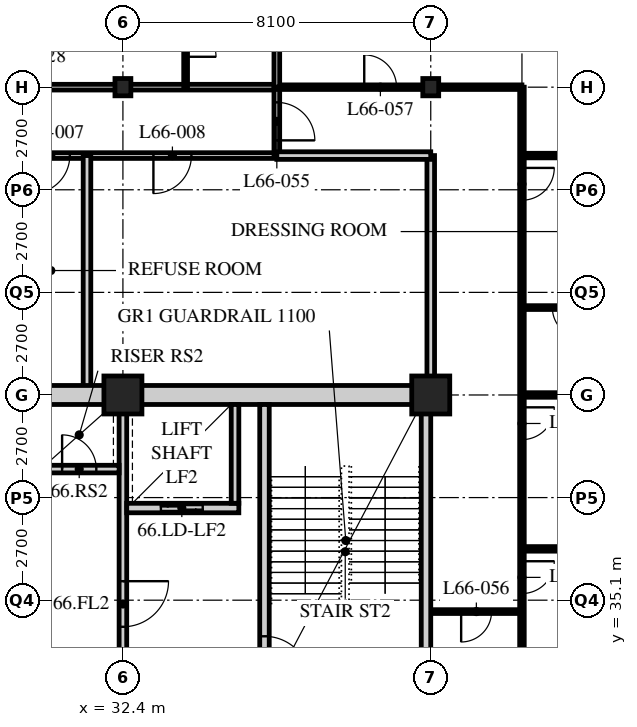
"""IFC4 building model, lengths in metres.
Left out: names, types, materials, properties, quantities, classifications, styles, units other than length and angle.
Written with IfcOpenShell. Run it as: python <this file> out.ifc"""

import sys

from ifc_helpers import new_model, si_unit, direction, frame, frame_2d, origin, origin_2d, place, context, subcontext, project, spatial, rectangle, hollow_rectangle, i_section, extrude, element, fill, save


model = new_model("IFC4")
c1 = context("Model", 3, precision=1e-05, world=origin(), true_north=direction((0.0, 1.0)))
c2 = subcontext(c1, "Body", "Model", "MODEL_VIEW")
j1 = project(units=[si_unit("LENGTHUNIT", "METRE"), si_unit("PLANEANGLEUNIT", "RADIAN")], contexts=[c1])
p1 = place(None, origin())
s1 = spatial("IfcSite", under=j1, at=p1, CompositionType="ELEMENT")
p2 = place(p1, origin())
s2 = spatial("IfcBuilding", under=s1, at=p2, CompositionType="ELEMENT")
p3 = place(p2, frame((0.0, 0.0, 258.0)))
s3 = spatial("IfcBuildingStorey", under=s2, at=p3, CompositionType="ELEMENT", Elevation=258.0)
p4 = place(p3, frame((32.4, 40.5, 0.0), z_axis=(0.0, 0.0, 1.0), x_axis=(1.0, 0.0, 0.0)))
e1 = element("IfcColumn", 1, at=p4, inside=s3, PredefinedType="COLUMN", context=c2, shape_type="SweptSolid", body=[
    extrude(hollow_rectangle(XDim=1.0, YDim=1.0, WallThickness=0.1, at=origin_2d()), origin(), (0.0, 0.0, 1.0), 3.9),
])
p5 = place(p3, frame((32.4, 48.6, 0.0), z_axis=(0.0, 0.0, 1.0), x_axis=(1.0, 0.0, 0.0)))
e2 = element("IfcColumn", 2, at=p5, inside=s3, PredefinedType="COLUMN", context=c2, shape_type="SweptSolid", body=[
    extrude(i_section(OverallWidth=0.418, OverallDepth=0.456, WebThickness=0.042, FlangeThickness=0.067, FilletRadius=0.015, at=origin_2d()), origin(), (0.0, 0.0, 1.0), 3.9),
])
p6 = place(p3, frame((40.5, 40.5, 0.0), z_axis=(0.0, 0.0, 1.0), x_axis=(1.0, 0.0, 0.0)))
e3 = element("IfcColumn", 3, at=p6, inside=s3, PredefinedType="COLUMN", context=c2, shape_type="SweptSolid", body=[
    extrude(hollow_rectangle(XDim=1.0, YDim=1.0, WallThickness=0.1, at=origin_2d()), origin(), (0.0, 0.0, 1.0), 3.9),
])
p7 = place(p3, frame((40.5, 48.6, 0.0), z_axis=(0.0, 0.0, 1.0), x_axis=(1.0, 0.0, 0.0)))
e4 = element("IfcColumn", 4, at=p7, inside=s3, PredefinedType="COLUMN", context=c2, shape_type="SweptSolid", body=[
    extrude(i_section(OverallWidth=0.418, OverallDepth=0.456, WebThickness=0.042, FlangeThickness=0.067, FilletRadius=0.015, at=origin_2d()), origin(), (0.0, 0.0, 1.0), 3.9),
])
p8 = place(p3, frame((8.1, 48.6, 0.0), z_axis=(0.0, 0.0, 1.0), x_axis=(1.0, 0.0, 0.0)))
e5 = element("IfcWall", 5, at=p8, inside=s3, PredefinedType="PARTITIONING", context=c2, shape_type="SweptSolid", body=[
    extrude(rectangle(XDim=28.35, YDim=0.15, at=frame_2d((14.175, 0.0))), origin(), (0.0, 0.0, 1.0), 3.078),
])
p9 = place(p8, frame((4.45, 0.0, 0.0)))
e6 = element("IfcOpeningElement", 6, at=p9, cuts=e5, PredefinedType="OPENING", context=c2, shape_type="SweptSolid", body=[
    extrude(rectangle(XDim=1.0, YDim=2.1, at=frame_2d((0.5, 1.05))), frame((0.0, 0.085, 0.0), z_axis=(0.0, -1.0, 0.0), x_axis=(1.0, 0.0, 0.0)), (0.0, 0.0, 1.0), 0.17),
])
p10 = place(p8, frame((20.65, 0.0, 0.0)))
e7 = element("IfcOpeningElement", 7, at=p10, cuts=e5, PredefinedType="OPENING", context=c2, shape_type="SweptSolid", body=[
    extrude(rectangle(XDim=1.0, YDim=2.1, at=frame_2d((0.5, 1.05))), frame((0.0, 0.085, 0.0), z_axis=(0.0, -1.0, 0.0), x_axis=(1.0, 0.0, 0.0)), (0.0, 0.0, 1.0), 0.17),
])
p11 = place(p8, frame((1.525, 0.0, 0.0)))
e8 = element("IfcOpeningElement", 8, at=p11, cuts=e5, PredefinedType="OPENING", context=c2, shape_type="SweptSolid", body=[
    extrude(rectangle(XDim=1.0, YDim=2.1, at=frame_2d((0.5, 1.05))), frame((0.0, 0.085, 0.0), z_axis=(0.0, -1.0, 0.0), x_axis=(1.0, 0.0, 0.0)), (0.0, 0.0, 1.0), 0.17),
])
p12 = place(p3, frame((29.56, 46.8, 0.0), z_axis=(0.0, 0.0, 1.0), x_axis=(1.0, 0.0, 0.0)))
e9 = element("IfcWall", 9, at=p12, inside=s3, PredefinedType="PARTITIONING", context=c2, shape_type="SweptSolid", body=[
    extrude(rectangle(XDim=6.89, YDim=0.15, at=frame_2d((3.445, 0.0))), origin(), (0.0, 0.0, 1.0), 3.69),
])
p13 = place(p12, frame((0.442, 0.0, 0.0)))
e10 = element("IfcOpeningElement", 10, at=p13, cuts=e9, PredefinedType="OPENING", context=c2, shape_type="SweptSolid", body=[
    extrude(rectangle(XDim=1.0, YDim=2.1, at=frame_2d((0.5, 1.05))), frame((0.0, 0.085, 0.0), z_axis=(0.0, -1.0, 0.0), x_axis=(1.0, 0.0, 0.0)), (0.0, 0.0, 1.0), 0.17),
])
p14 = place(p12, frame((3.642, 0.0, 0.0)))
e11 = element("IfcOpeningElement", 11, at=p14, cuts=e9, PredefinedType="OPENING", context=c2, shape_type="SweptSolid", body=[
    extrude(rectangle(XDim=1.0, YDim=2.1, at=frame_2d((0.5, 1.05))), frame((0.0, 0.085, 0.0), z_axis=(0.0, -1.0, 0.0), x_axis=(1.0, 0.0, 0.0)), (0.0, 0.0, 1.0), 0.17),
])
p15 = place(p3, frame((31.455, 46.8, 0.0), z_axis=(0.0, 0.0, 1.0), x_axis=(0.0, -1.0, 0.0)))
e12 = element("IfcWall", 12, at=p15, inside=s3, PredefinedType="SOLIDWALL", context=c2, shape_type="SweptSolid", body=[
    extrude(rectangle(XDim=6.3, YDim=0.2, at=frame_2d((3.15, 0.0))), origin(), (0.0, 0.0, 1.0), 3.69),
])
p16 = place(p3, frame((36.45, 46.8, 0.0), z_axis=(0.0, 0.0, 1.0), x_axis=(0.0, 1.0, 0.0)))
e13 = element("IfcWall", 13, at=p16, inside=s3, PredefinedType="PARTITIONING", context=c2, shape_type="SweptSolid", body=[
    extrude(rectangle(XDim=1.8, YDim=0.15, at=frame_2d((0.9, 0.0))), origin(), (0.0, 0.0, 1.0), 3.69),
])
p17 = place(p16, frame((0.4, 0.0, 0.0)))
e14 = element("IfcOpeningElement", 14, at=p17, cuts=e13, PredefinedType="OPENING", context=c2, shape_type="SweptSolid", body=[
    extrude(rectangle(XDim=1.0, YDim=2.1, at=frame_2d((0.5, 1.05))), frame((0.0, 0.085, 0.0), z_axis=(0.0, -1.0, 0.0), x_axis=(1.0, 0.0, 0.0)), (0.0, 0.0, 1.0), 0.17),
])
p18 = place(p3, frame((40.5, 40.5, 0.0), z_axis=(0.0, 0.0, 1.0), x_axis=(0.0, 1.0, 0.0)))
e15 = element("IfcWall", 15, at=p18, inside=s3, PredefinedType="SOLIDWALL", context=c2, shape_type="SweptSolid", body=[
    extrude(rectangle(XDim=6.3, YDim=0.2, at=frame_2d((3.15, 0.0))), origin(), (0.0, 0.0, 1.0), 3.078),
])
p19 = place(p3, frame((34.05, 48.6, 0.0), z_axis=(0.0, 0.0, 1.0), x_axis=(0.0, 1.0, 0.0)))
e16 = element("IfcWall", 16, at=p19, inside=s3, PredefinedType="PARTITIONING", context=c2, shape_type="SweptSolid", body=[
    extrude(rectangle(XDim=2.4, YDim=0.1, at=frame_2d((1.2, 0.0))), origin(), (0.0, 0.0, 1.0), 3.69),
])
p20 = place(p19, frame((0.8, 0.0, 0.0)))
e17 = element("IfcOpeningElement", 17, at=p20, cuts=e16, PredefinedType="OPENING", context=c2, shape_type="SweptSolid", body=[
    extrude(rectangle(XDim=0.8, YDim=2.1, at=frame_2d((0.4, 1.05))), frame((0.0, 0.06, 0.0), z_axis=(0.0, -1.0, 0.0), x_axis=(1.0, 0.0, 0.0)), (0.0, 0.0, 1.0), 0.12),
])
p21 = place(p3, frame((40.5, 34.8, 0.0), z_axis=(0.0, 0.0, 1.0), x_axis=(1.0, 0.0, 0.0)))
e18 = element("IfcWall", 18, at=p21, inside=s3, PredefinedType="PARTITIONING", context=c2, shape_type="SweptSolid", body=[
    extrude(rectangle(XDim=2.4, YDim=0.1, at=frame_2d((1.2, 0.0))), origin(), (0.0, 0.0, 1.0), 3.69),
])
p22 = place(p21, frame((0.8, 0.0, 0.0)))
e19 = element("IfcOpeningElement", 19, at=p22, cuts=e18, PredefinedType="OPENING", context=c2, shape_type="SweptSolid", body=[
    extrude(rectangle(XDim=0.8, YDim=2.1, at=frame_2d((0.4, 1.05))), frame((0.0, 0.06, 0.0), z_axis=(0.0, -1.0, 0.0), x_axis=(1.0, 0.0, 0.0)), (0.0, 0.0, 1.0), 0.12),
])
p23 = place(p3, frame((42.9, 48.6, 0.0), z_axis=(0.0, 0.0, 1.0), x_axis=(0.0, -1.0, 0.0)))
e20 = element("IfcWall", 20, at=p23, inside=s3, PredefinedType="PARTITIONING", context=c2, shape_type="SweptSolid", body=[
    extrude(rectangle(XDim=16.2, YDim=0.12, at=frame_2d((8.1, 0.0))), origin(), (0.0, 0.0, 1.0), 3.69),
])
p24 = place(p23, frame((2.125, 0.0, 0.0)))
e21 = element("IfcOpeningElement", 21, at=p24, cuts=e20, PredefinedType="OPENING", context=c2, shape_type="SweptSolid", body=[
    extrude(rectangle(XDim=0.85, YDim=2.1, at=frame_2d((0.425, 1.05))), frame((0.0, 0.07, 0.0), z_axis=(0.0, -1.0, 0.0), x_axis=(1.0, 0.0, 0.0)), (0.0, 0.0, 1.0), 0.14),
])
p25 = place(p23, frame((8.425, 0.0, 0.0)))
e22 = element("IfcOpeningElement", 22, at=p25, cuts=e20, PredefinedType="OPENING", context=c2, shape_type="SweptSolid", body=[
    extrude(rectangle(XDim=0.85, YDim=2.1, at=frame_2d((0.425, 1.05))), frame((0.0, 0.07, 0.0), z_axis=(0.0, -1.0, 0.0), x_axis=(1.0, 0.0, 0.0)), (0.0, 0.0, 1.0), 0.14),
])
p26 = place(p23, frame((12.475, 0.0, 0.0)))
e23 = element("IfcOpeningElement", 23, at=p26, cuts=e20, PredefinedType="OPENING", context=c2, shape_type="SweptSolid", body=[
    extrude(rectangle(XDim=0.85, YDim=2.1, at=frame_2d((0.425, 1.05))), frame((0.0, 0.07, 0.0), z_axis=(0.0, -1.0, 0.0), x_axis=(1.0, 0.0, 0.0)), (0.0, 0.0, 1.0), 0.14),
])
p27 = place(p3, frame((36.45, 48.6, 0.0), z_axis=(0.0, 0.0, 1.0), x_axis=(1.0, 0.0, 0.0)))
e24 = element("IfcWall", 24, at=p27, inside=s3, PredefinedType="PARTITIONING", context=c2, shape_type="SweptSolid", body=[
    extrude(rectangle(XDim=6.45, YDim=0.12, at=frame_2d((3.225, 0.0))), origin(), (0.0, 0.0, 1.0), 3.078),
])
p28 = place(p27, frame((2.3, 0.0, 0.0)))
e25 = element("IfcOpeningElement", 25, at=p28, cuts=e24, PredefinedType="OPENING", context=c2, shape_type="SweptSolid", body=[
    extrude(rectangle(XDim=0.85, YDim=2.1, at=frame_2d((0.425, 1.05))), frame((0.0, 0.07, 0.0), z_axis=(0.0, -1.0, 0.0), x_axis=(1.0, 0.0, 0.0)), (0.0, 0.0, 1.0), 0.14),
])
p29 = place(p3, frame((36.45, 46.8, 0.0), z_axis=(0.0, 0.0, 1.0), x_axis=(1.0, 0.0, 0.0)))
e26 = element("IfcWall", 26, at=p29, inside=s3, PredefinedType="SOLIDWALL", context=c2, shape_type="SweptSolid", body=[
    extrude(rectangle(XDim=4.05, YDim=0.2, at=frame_2d((2.025, 0.0))), origin(), (0.0, 0.0, 1.0), 3.69),
])
p30 = place(p3, frame((42.9, 46.8, 0.0), z_axis=(0.0, 0.0, 1.0), x_axis=(1.0, 0.0, 0.0)))
e27 = element("IfcWall", 27, at=p30, inside=s3, PredefinedType="PARTITIONING", context=c2, shape_type="SweptSolid", body=[
    extrude(rectangle(XDim=13.5, YDim=0.12, at=frame_2d((6.75, 0.0))), origin(), (0.0, 0.0, 1.0), 3.69),
])
p31 = place(p3, frame((36.45, 64.5, 0.0), z_axis=(0.0, 0.0, 1.0), x_axis=(0.0, -1.0, 0.0)))
e28 = element("IfcWall", 28, at=p31, inside=s3, PredefinedType="PARTITIONING", context=c2, shape_type="SweptSolid", body=[
    extrude(rectangle(XDim=15.9, YDim=0.15, at=frame_2d((7.95, 0.0))), origin(), (0.0, 0.0, 1.0), 3.69),
])
p32 = place(p3, frame((42.9, 42.8, 0.0), z_axis=(0.0, 0.0, 1.0), x_axis=(1.0, 0.0, 0.0)))
e29 = element("IfcWall", 29, at=p32, inside=s3, PredefinedType="PARTITIONING", context=c2, shape_type="SweptSolid", body=[
    extrude(rectangle(XDim=2.4, YDim=0.1, at=frame_2d((1.2, 0.0))), origin(), (0.0, 0.0, 1.0), 3.69),
])
p33 = place(p32, frame((0.8, 0.0, 0.0)))
e30 = element("IfcOpeningElement", 30, at=p33, cuts=e29, PredefinedType="OPENING", context=c2, shape_type="SweptSolid", body=[
    extrude(rectangle(XDim=0.8, YDim=2.1, at=frame_2d((0.4, 1.05))), frame((0.0, 0.06, 0.0), z_axis=(0.0, -1.0, 0.0), x_axis=(1.0, 0.0, 0.0)), (0.0, 0.0, 1.0), 0.12),
])
p34 = place(p3, frame((42.9, 40.5, 0.0), z_axis=(0.0, 0.0, 1.0), x_axis=(1.0, 0.0, 0.0)))
e31 = element("IfcWall", 31, at=p34, inside=s3, PredefinedType="PARTITIONING", context=c2, shape_type="SweptSolid", body=[
    extrude(rectangle(XDim=13.5, YDim=0.12, at=frame_2d((6.75, 0.0))), origin(), (0.0, 0.0, 1.0), 3.078),
])
p35 = place(p3, frame((42.9, 36.45, 0.0), z_axis=(0.0, 0.0, 1.0), x_axis=(1.0, 0.0, 0.0)))
e32 = element("IfcWall", 32, at=p35, inside=s3, PredefinedType="PARTITIONING", context=c2, shape_type="SweptSolid", body=[
    extrude(rectangle(XDim=13.5, YDim=0.12, at=frame_2d((6.75, 0.0))), origin(), (0.0, 0.0, 1.0), 3.69),
])
p36 = place(p3, frame((15.95, 40.5, 0.0), z_axis=(0.0, 0.0, 1.0), x_axis=(1.0, 0.0, 0.0)))
e33 = element("IfcWall", 33, at=p36, inside=s3, PredefinedType="SOLIDWALL", context=c2, shape_type="SweptSolid", body=[
    extrude(rectangle(XDim=24.55, YDim=0.5, at=frame_2d((12.275, 0.0))), origin(), (0.0, 0.0, 1.0), 3.04),
])
p37 = place(p36, frame((11.5, 0.0, 0.0)))
e34 = element("IfcOpeningElement", 34, at=p37, cuts=e33, PredefinedType="OPENING", context=c2, shape_type="SweptSolid", body=[
    extrude(rectangle(XDim=1.8, YDim=2.4, at=frame_2d((0.9, 1.2))), frame((0.0, 0.26, 0.0), z_axis=(0.0, -1.0, 0.0), x_axis=(1.0, 0.0, 0.0)), (0.0, 0.0, 1.0), 0.52),
])
p38 = place(p3, frame((40.375, 24.55, 0.0), z_axis=(0.0, 0.0, 1.0), x_axis=(0.0, 1.0, 0.0)))
e35 = element("IfcWall", 35, at=p38, inside=s3, PredefinedType="SOLIDWALL", context=c2, shape_type="SweptSolid", body=[
    extrude(rectangle(XDim=15.7, YDim=0.25, at=frame_2d((7.85, 0.0))), origin(), (0.0, 0.0, 1.0), 3.078),
])
p39 = place(p3, frame((32.4, 32.5, 0.0), z_axis=(0.0, 0.0, 1.0), x_axis=(0.0, 1.0, 0.0)))
e36 = element("IfcWall", 36, at=p39, inside=s3, PredefinedType="SOLIDWALL", context=c2, shape_type="SweptSolid", body=[
    extrude(rectangle(XDim=7.75, YDim=0.2, at=frame_2d((3.875, 0.0))), origin(), (0.0, 0.0, 1.0), 3.078),
])
p40 = place(p39, frame((1.9, 0.0, 0.0)))
e37 = element("IfcOpeningElement", 37, at=p40, cuts=e36, PredefinedType="OPENING", context=c2, shape_type="SweptSolid", body=[
    extrude(rectangle(XDim=1.2, YDim=2.1, at=frame_2d((0.6, 1.05))), frame((0.0, 0.11, 0.0), z_axis=(0.0, -1.0, 0.0), x_axis=(1.0, 0.0, 0.0)), (0.0, 0.0, 1.0), 0.22),
])
p41 = place(p3, frame((36.125, 32.5, 0.0), z_axis=(0.0, 0.0, 1.0), x_axis=(0.0, 1.0, 0.0)))
e38 = element("IfcWall", 38, at=p41, inside=s3, PredefinedType="SOLIDWALL", context=c2, shape_type="SweptSolid", body=[
    extrude(rectangle(XDim=7.75, YDim=0.25, at=frame_2d((3.875, 0.0))), origin(), (0.0, 0.0, 1.0), 3.69),
])
p42 = place(p41, frame((0.45, 0.0, 0.0)))
e39 = element("IfcOpeningElement", 39, at=p42, cuts=e38, PredefinedType="OPENING", context=c2, shape_type="SweptSolid", body=[
    extrude(rectangle(XDim=1.2, YDim=2.1, at=frame_2d((0.6, 1.05))), frame((0.0, 0.135, 0.0), z_axis=(0.0, -1.0, 0.0), x_axis=(1.0, 0.0, 0.0)), (0.0, 0.0, 1.0), 0.27),
])
p43 = place(p3, frame((32.5, 37.525, 0.0), z_axis=(0.0, 0.0, 1.0), x_axis=(1.0, 0.0, 0.0)))
e40 = element("IfcWall", 40, at=p43, inside=s3, PredefinedType="SOLIDWALL", context=c2, shape_type="SweptSolid", body=[
    extrude(rectangle(XDim=2.95, YDim=0.25, at=frame_2d((1.475, 0.0))), origin(), (0.0, 0.0, 1.0), 3.69),
])
p44 = place(p43, frame((0.9, 0.0, 0.0)))
e41 = element("IfcOpeningElement", 41, at=p44, cuts=e40, PredefinedType="OPENING", context=c2, shape_type="SweptSolid", body=[
    extrude(rectangle(XDim=1.1, YDim=2.4, at=frame_2d((0.55, 1.2))), frame((0.0, 0.135, 0.0), z_axis=(0.0, -1.0, 0.0), x_axis=(1.0, 0.0, 0.0)), (0.0, 0.0, 1.0), 0.27),
])
p45 = place(p3, frame((35.35, 37.65, 0.0), z_axis=(0.0, 0.0, 1.0), x_axis=(0.0, 1.0, 0.0)))
e42 = element("IfcWall", 42, at=p45, inside=s3, PredefinedType="SOLIDWALL", context=c2, shape_type="SweptSolid", body=[
    extrude(rectangle(XDim=2.6, YDim=0.2, at=frame_2d((1.3, 0.0))), origin(), (0.0, 0.0, 1.0), 3.69),
])
p46 = place(p3, frame((30.15, 38.55, 0.0), z_axis=(0.0, 0.0, 1.0), x_axis=(1.0, 0.0, 0.0)))
e43 = element("IfcWall", 43, at=p46, inside=s3, PredefinedType="SOLIDWALL", context=c2, shape_type="SweptSolid", body=[
    extrude(rectangle(XDim=2.15, YDim=0.2, at=frame_2d((1.075, 0.0))), origin(), (0.0, 0.0, 1.0), 3.69),
])
p47 = place(p46, frame((0.65, 0.0, 0.0)))
e44 = element("IfcOpeningElement", 44, at=p47, cuts=e43, PredefinedType="OPENING", context=c2, shape_type="SweptSolid", body=[
    extrude(rectangle(XDim=0.9, YDim=2.1, at=frame_2d((0.45, 1.05))), frame((0.0, 0.11, 0.0), z_axis=(0.0, -1.0, 0.0), x_axis=(1.0, 0.0, 0.0)), (0.0, 0.0, 1.0), 0.22),
])
p48 = place(p13, origin())
e45 = element("IfcDoor", 45, at=p48, inside=s3, OperationType="SINGLE_SWING_RIGHT", PredefinedType="DOOR", context=c2, shape_type="SweptSolid", body=[
    extrude(rectangle(XDim=1.0, YDim=2.1, at=frame_2d((0.5, 1.05))), frame((0.0, 0.025, 0.0), z_axis=(0.0, -1.0, 0.0), x_axis=(1.0, 0.0, 0.0)), (0.0, 0.0, 1.0), 0.05),
])
fill(e10, e45)
p49 = place(p14, origin())
e46 = element("IfcDoor", 46, at=p49, inside=s3, OperationType="SINGLE_SWING_RIGHT", PredefinedType="DOOR", context=c2, shape_type="SweptSolid", body=[
    extrude(rectangle(XDim=1.0, YDim=2.1, at=frame_2d((0.5, 1.05))), frame((0.0, 0.025, 0.0), z_axis=(0.0, -1.0, 0.0), x_axis=(1.0, 0.0, 0.0)), (0.0, 0.0, 1.0), 0.05),
])
fill(e11, e46)
p50 = place(p20, origin())
e47 = element("IfcDoor", 47, at=p50, inside=s3, OperationType="SINGLE_SWING_RIGHT", PredefinedType="DOOR", context=c2, shape_type="SweptSolid", body=[
    extrude(rectangle(XDim=0.8, YDim=2.1, at=frame_2d((0.4, 1.05))), frame((0.0, 0.025, 0.0), z_axis=(0.0, -1.0, 0.0), x_axis=(1.0, 0.0, 0.0)), (0.0, 0.0, 1.0), 0.05),
])
fill(e17, e47)
p51 = place(p17, origin())
e48 = element("IfcDoor", 48, at=p51, inside=s3, OperationType="SINGLE_SWING_RIGHT", PredefinedType="DOOR", context=c2, shape_type="SweptSolid", body=[
    extrude(rectangle(XDim=1.0, YDim=2.1, at=frame_2d((0.5, 1.05))), frame((0.0, 0.025, 0.0), z_axis=(0.0, -1.0, 0.0), x_axis=(1.0, 0.0, 0.0)), (0.0, 0.0, 1.0), 0.05),
])
fill(e14, e48)
p52 = place(p22, origin())
e49 = element("IfcDoor", 49, at=p52, inside=s3, OperationType="SINGLE_SWING_RIGHT", PredefinedType="DOOR", context=c2, shape_type="SweptSolid", body=[
    extrude(rectangle(XDim=0.8, YDim=2.1, at=frame_2d((0.4, 1.05))), frame((0.0, 0.025, 0.0), z_axis=(0.0, -1.0, 0.0), x_axis=(1.0, 0.0, 0.0)), (0.0, 0.0, 1.0), 0.05),
])
fill(e19, e49)
p53 = place(p28, origin())
e50 = element("IfcDoor", 50, at=p53, inside=s3, OperationType="SINGLE_SWING_LEFT", PredefinedType="DOOR", context=c2, shape_type="SweptSolid", body=[
    extrude(rectangle(XDim=0.85, YDim=2.1, at=frame_2d((0.425, 1.05))), frame((0.0, 0.025, 0.0), z_axis=(0.0, -1.0, 0.0), x_axis=(1.0, 0.0, 0.0)), (0.0, 0.0, 1.0), 0.05),
])
fill(e25, e50)
p54 = place(p33, origin())
e51 = element("IfcDoor", 51, at=p54, inside=s3, OperationType="SINGLE_SWING_LEFT", PredefinedType="DOOR", context=c2, shape_type="SweptSolid", body=[
    extrude(rectangle(XDim=0.8, YDim=2.1, at=frame_2d((0.4, 1.05))), frame((0.0, 0.025, 0.0), z_axis=(0.0, -1.0, 0.0), x_axis=(1.0, 0.0, 0.0)), (0.0, 0.0, 1.0), 0.05),
])
fill(e30, e51)
p55 = place(p24, origin())
e52 = element("IfcDoor", 52, at=p55, inside=s3, OperationType="SINGLE_SWING_LEFT", PredefinedType="DOOR", context=c2, shape_type="SweptSolid", body=[
    extrude(rectangle(XDim=0.85, YDim=2.1, at=frame_2d((0.425, 1.05))), frame((0.0, 0.025, 0.0), z_axis=(0.0, -1.0, 0.0), x_axis=(1.0, 0.0, 0.0)), (0.0, 0.0, 1.0), 0.05),
])
fill(e21, e52)
p56 = place(p25, origin())
e53 = element("IfcDoor", 53, at=p56, inside=s3, OperationType="SINGLE_SWING_LEFT", PredefinedType="DOOR", context=c2, shape_type="SweptSolid", body=[
    extrude(rectangle(XDim=0.85, YDim=2.1, at=frame_2d((0.425, 1.05))), frame((0.0, 0.025, 0.0), z_axis=(0.0, -1.0, 0.0), x_axis=(1.0, 0.0, 0.0)), (0.0, 0.0, 1.0), 0.05),
])
fill(e22, e53)
p57 = place(p26, origin())
e54 = element("IfcDoor", 54, at=p57, inside=s3, OperationType="SINGLE_SWING_LEFT", PredefinedType="DOOR", context=c2, shape_type="SweptSolid", body=[
    extrude(rectangle(XDim=0.85, YDim=2.1, at=frame_2d((0.425, 1.05))), frame((0.0, 0.025, 0.0), z_axis=(0.0, -1.0, 0.0), x_axis=(1.0, 0.0, 0.0)), (0.0, 0.0, 1.0), 0.05),
])
fill(e23, e54)
p58 = place(p42, origin())
e55 = element("IfcDoor", 55, at=p58, inside=s3, OperationType="SINGLE_SWING_RIGHT", PredefinedType="DOOR", context=c2, shape_type="SweptSolid", body=[
    extrude(rectangle(XDim=1.2, YDim=2.1, at=frame_2d((0.6, 1.05))), frame((0.0, 0.025, 0.0), z_axis=(0.0, -1.0, 0.0), x_axis=(1.0, 0.0, 0.0)), (0.0, 0.0, 1.0), 0.05),
])
fill(e39, e55)
p59 = place(p40, origin())
e56 = element("IfcDoor", 56, at=p59, inside=s3, OperationType="SINGLE_SWING_LEFT", PredefinedType="DOOR", context=c2, shape_type="SweptSolid", body=[
    extrude(rectangle(XDim=1.2, YDim=2.1, at=frame_2d((0.6, 1.05))), frame((0.0, 0.025, 0.0), z_axis=(0.0, -1.0, 0.0), x_axis=(1.0, 0.0, 0.0)), (0.0, 0.0, 1.0), 0.05),
])
fill(e37, e56)
p60 = place(p47, origin())
e57 = element("IfcDoor", 57, at=p60, inside=s3, OperationType="SINGLE_SWING_LEFT", PredefinedType="DOOR", context=c2, shape_type="SweptSolid", body=[
    extrude(rectangle(XDim=0.9, YDim=2.1, at=frame_2d((0.45, 1.05))), frame((0.0, 0.025, 0.0), z_axis=(0.0, -1.0, 0.0), x_axis=(1.0, 0.0, 0.0)), (0.0, 0.0, 1.0), 0.05),
])
fill(e44, e57)
p61 = place(p44, origin())
e58 = element("IfcDoor", 58, at=p61, inside=s3, OperationType="DOUBLE_DOOR_SLIDING", PredefinedType="DOOR", context=c2, shape_type="SweptSolid", body=[
    extrude(rectangle(XDim=1.1, YDim=2.4, at=frame_2d((0.55, 1.2))), frame((0.0, 0.025, 0.0), z_axis=(0.0, -1.0, 0.0), x_axis=(1.0, 0.0, 0.0)), (0.0, 0.0, 1.0), 0.05),
])
fill(e41, e58)
save(model, sys.argv[1])
